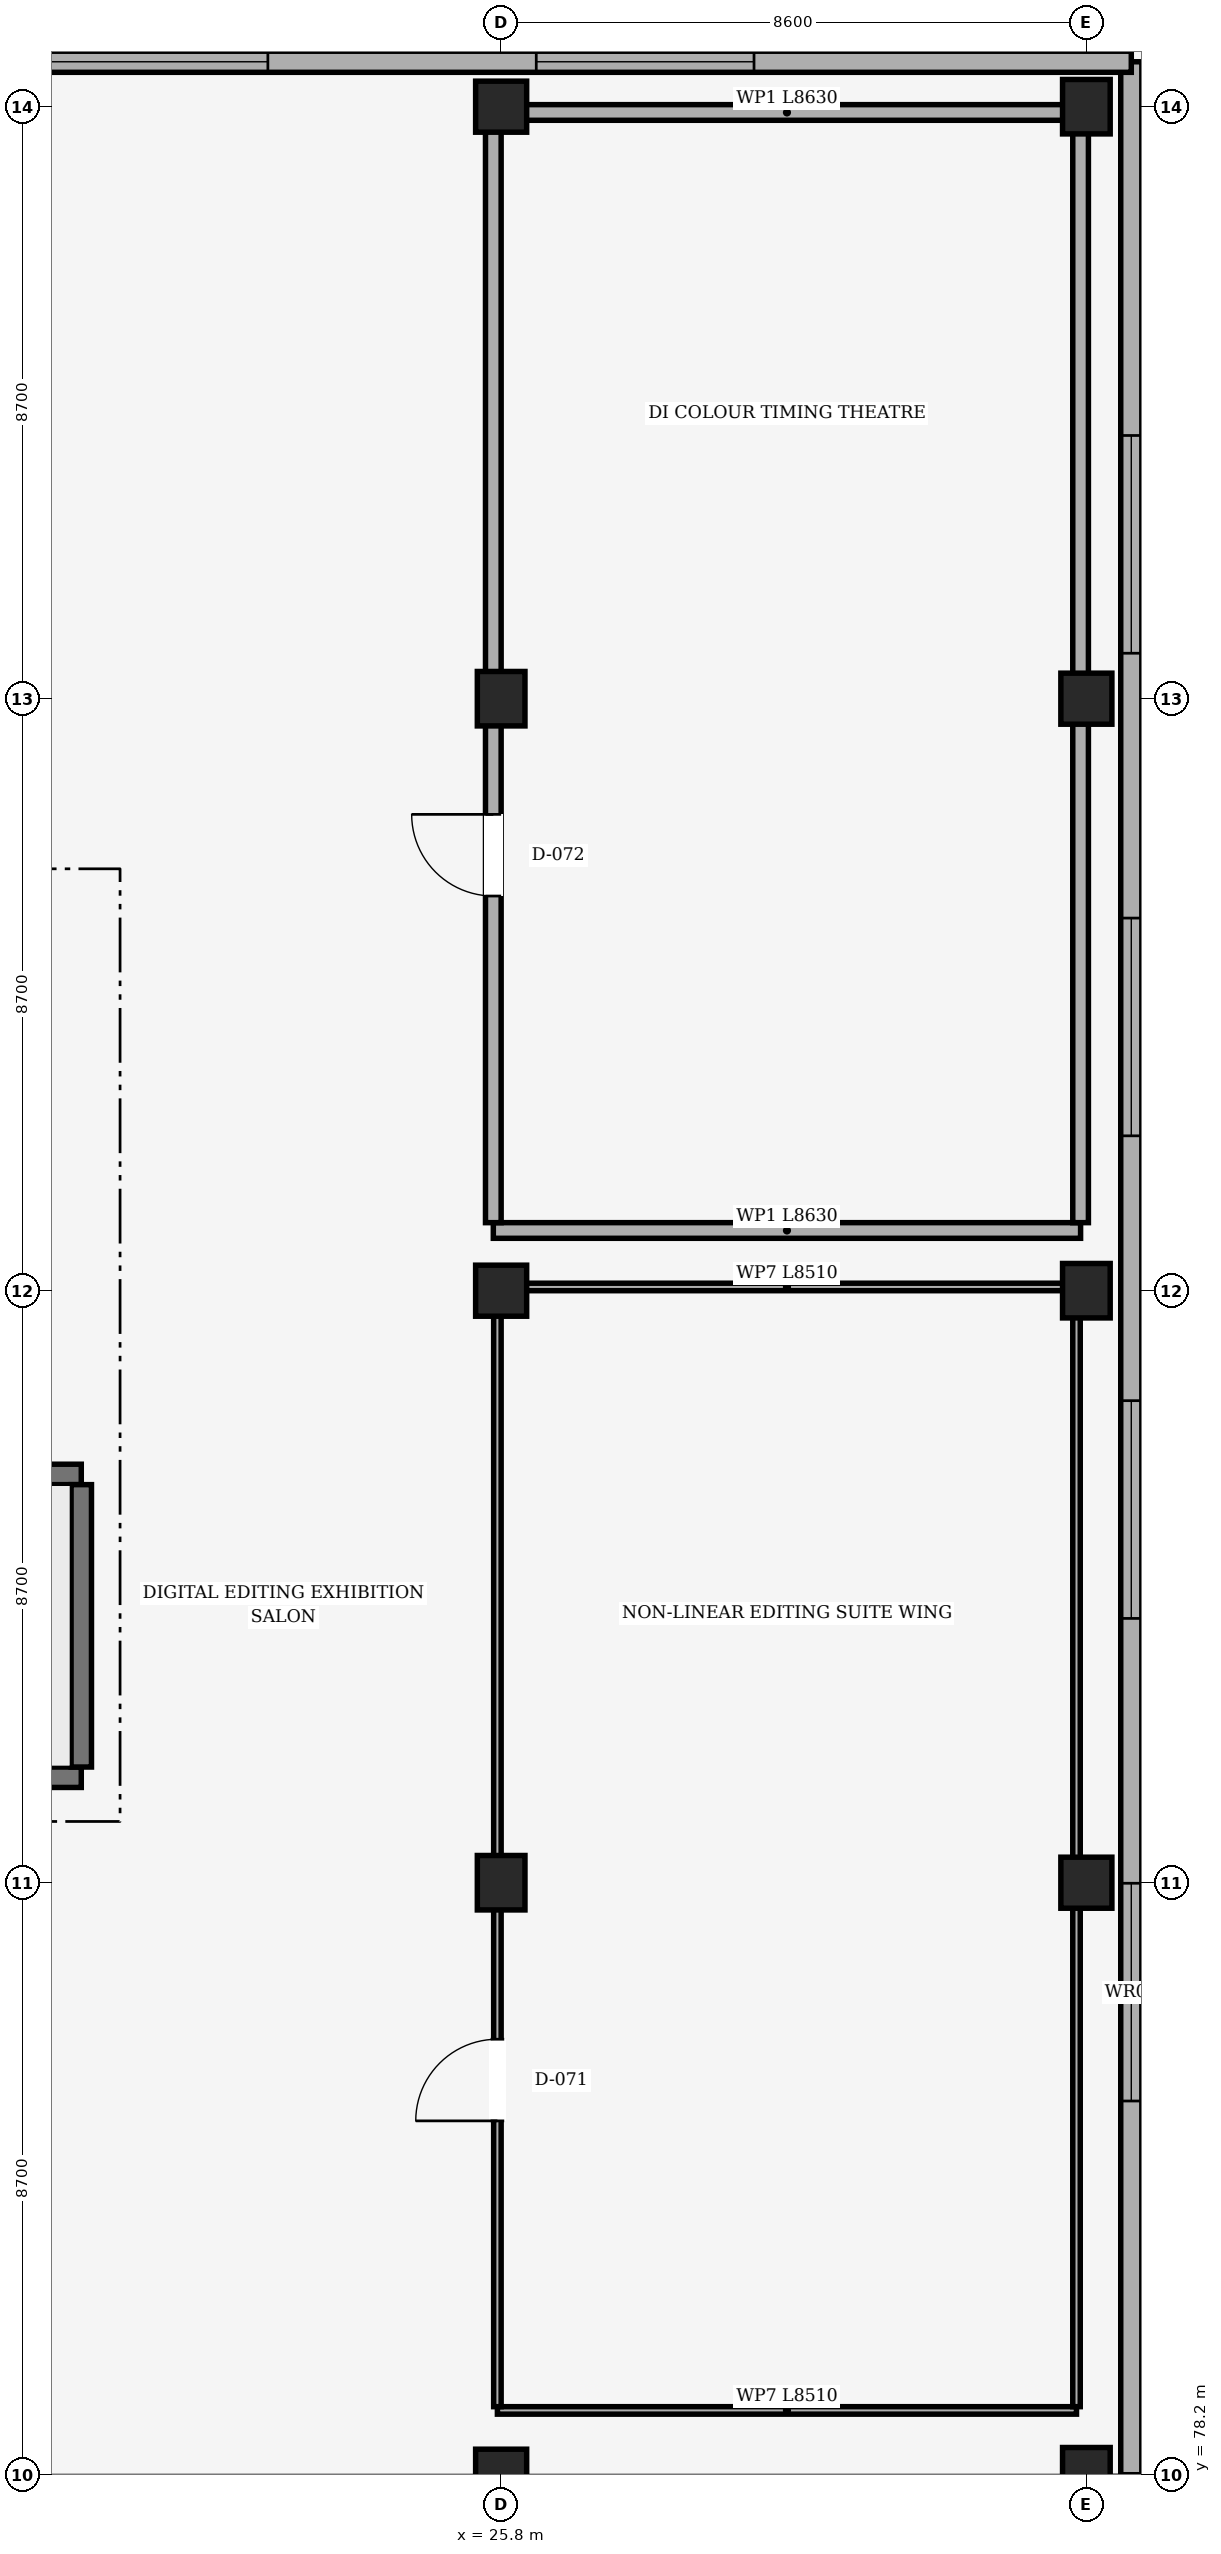
"""IFC4 building model, lengths in metres.
Left out: names, types, materials, properties, quantities, classifications, styles, units other than length and angle.
Written with IfcOpenShell. Run it as: python <this file> out.ifc"""

import sys

from ifc_helpers import new_model, si_unit, direction, frame, frame_2d, origin, origin_2d, place, context, subcontext, project, spatial, rectangle, extrude, element, fill, save


model = new_model("IFC4")
c1 = context("Model", 3, precision=1e-05, world=origin(), true_north=direction((0.0, 1.0)))
c2 = subcontext(c1, "Body", "Model", "MODEL_VIEW")
j1 = project(units=[si_unit("LENGTHUNIT", "METRE"), si_unit("PLANEANGLEUNIT", "RADIAN")], contexts=[c1])
p1 = place(None, origin())
s1 = spatial("IfcSite", under=j1, at=p1, CompositionType="ELEMENT")
p2 = place(p1, origin())
s2 = spatial("IfcBuilding", under=s1, at=p2, CompositionType="ELEMENT")
p3 = place(p2, frame((0.0, 0.0, 4.5)))
s3 = spatial("IfcBuildingStorey", under=s2, at=p3, CompositionType="ELEMENT", Elevation=4.5)
p4 = place(p3, frame((25.8, 78.2, 0.0), z_axis=(0.0, 0.0, 1.0), x_axis=(1.0, 0.0, 0.0)))
e1 = element("IfcColumn", 1, at=p4, inside=s3, PredefinedType="COLUMN", context=c2, shape_type="SweptSolid", body=[
    extrude(rectangle(XDim=0.75, YDim=0.75, at=origin_2d()), origin(), (0.0, 0.0, 1.0), 3.65),
])
p5 = place(p3, frame((25.8, 86.9, 0.0), z_axis=(0.0, 0.0, 1.0), x_axis=(1.0, 0.0, 0.0)))
e2 = element("IfcColumn", 2, at=p5, inside=s3, PredefinedType="COLUMN", context=c2, shape_type="SweptSolid", body=[
    extrude(rectangle(XDim=0.7, YDim=0.8, at=origin_2d()), origin(), (0.0, 0.0, 1.0), 3.65),
])
p6 = place(p3, frame((25.8, 95.6, 0.0), z_axis=(0.0, 0.0, 1.0), x_axis=(1.0, 0.0, 0.0)))
e3 = element("IfcColumn", 3, at=p6, inside=s3, PredefinedType="COLUMN", context=c2, shape_type="SweptSolid", body=[
    extrude(rectangle(XDim=0.75, YDim=0.75, at=origin_2d()), origin(), (0.0, 0.0, 1.0), 3.65),
])
p7 = place(p3, frame((25.8, 104.3, 0.0), z_axis=(0.0, 0.0, 1.0), x_axis=(1.0, 0.0, 0.0)))
e4 = element("IfcColumn", 4, at=p7, inside=s3, PredefinedType="COLUMN", context=c2, shape_type="SweptSolid", body=[
    extrude(rectangle(XDim=0.7, YDim=0.8, at=origin_2d()), origin(), (0.0, 0.0, 1.0), 3.65),
])
p8 = place(p3, frame((25.8, 113.0, 0.0), z_axis=(0.0, 0.0, 1.0), x_axis=(1.0, 0.0, 0.0)))
e5 = element("IfcColumn", 5, at=p8, inside=s3, PredefinedType="COLUMN", context=c2, shape_type="SweptSolid", body=[
    extrude(rectangle(XDim=0.75, YDim=0.75, at=origin_2d()), origin(), (0.0, 0.0, 1.0), 3.65),
])
p9 = place(p3, frame((34.4, 78.2, 0.0), z_axis=(0.0, 0.0, 1.0), x_axis=(1.0, 0.0, 0.0)))
e6 = element("IfcColumn", 6, at=p9, inside=s3, PredefinedType="COLUMN", context=c2, shape_type="SweptSolid", body=[
    extrude(rectangle(XDim=0.7, YDim=0.8, at=origin_2d()), origin(), (0.0, 0.0, 1.0), 3.65),
])
p10 = place(p3, frame((34.4, 86.9, 0.0), z_axis=(0.0, 0.0, 1.0), x_axis=(1.0, 0.0, 0.0)))
e7 = element("IfcColumn", 7, at=p10, inside=s3, PredefinedType="COLUMN", context=c2, shape_type="SweptSolid", body=[
    extrude(rectangle(XDim=0.75, YDim=0.75, at=origin_2d()), origin(), (0.0, 0.0, 1.0), 3.65),
])
p11 = place(p3, frame((34.4, 95.6, 0.0), z_axis=(0.0, 0.0, 1.0), x_axis=(1.0, 0.0, 0.0)))
e8 = element("IfcColumn", 8, at=p11, inside=s3, PredefinedType="COLUMN", context=c2, shape_type="SweptSolid", body=[
    extrude(rectangle(XDim=0.7, YDim=0.8, at=origin_2d()), origin(), (0.0, 0.0, 1.0), 3.65),
])
p12 = place(p3, frame((34.4, 104.3, 0.0), z_axis=(0.0, 0.0, 1.0), x_axis=(1.0, 0.0, 0.0)))
e9 = element("IfcColumn", 9, at=p12, inside=s3, PredefinedType="COLUMN", context=c2, shape_type="SweptSolid", body=[
    extrude(rectangle(XDim=0.75, YDim=0.75, at=origin_2d()), origin(), (0.0, 0.0, 1.0), 3.65),
])
p13 = place(p3, frame((34.4, 113.0, 0.0), z_axis=(0.0, 0.0, 1.0), x_axis=(1.0, 0.0, 0.0)))
e10 = element("IfcColumn", 10, at=p13, inside=s3, PredefinedType="COLUMN", context=c2, shape_type="SweptSolid", body=[
    extrude(rectangle(XDim=0.7, YDim=0.8, at=origin_2d()), origin(), (0.0, 0.0, 1.0), 3.65),
])
p14 = place(p3, frame((35.06, 78.2, 0.0), z_axis=(0.0, 0.0, 1.0), x_axis=(0.0, 1.0, 0.0)))
e11 = element("IfcWall", 11, at=p14, inside=s3, PredefinedType="SOLIDWALL", context=c2, shape_type="SweptSolid", body=[
    extrude(rectangle(XDim=35.46, YDim=0.31, at=frame_2d((17.73, 0.0))), origin(), (0.0, 0.0, 1.0), 3.9),
])
p15 = place(p14, frame((5.492, 0.0, 1.55)))
e12 = element("IfcOpeningElement", 12, at=p15, cuts=e11, PredefinedType="OPENING", context=c2, shape_type="SweptSolid", body=[
    extrude(rectangle(XDim=3.2, YDim=0.7, at=frame_2d((1.6, 0.35))), frame((0.0, 0.155, 0.0), z_axis=(0.0, -1.0, 0.0), x_axis=(1.0, 0.0, 0.0)), (0.0, 0.0, 1.0), 0.31),
])
p16 = place(p14, frame((12.584, 0.0, 1.55)))
e13 = element("IfcOpeningElement", 13, at=p16, cuts=e11, PredefinedType="OPENING", context=c2, shape_type="SweptSolid", body=[
    extrude(rectangle(XDim=3.2, YDim=0.7, at=frame_2d((1.6, 0.35))), frame((0.0, 0.155, 0.0), z_axis=(0.0, -1.0, 0.0), x_axis=(1.0, 0.0, 0.0)), (0.0, 0.0, 1.0), 0.31),
])
p17 = place(p14, frame((19.676, 0.0, 1.55)))
e14 = element("IfcOpeningElement", 14, at=p17, cuts=e11, PredefinedType="OPENING", context=c2, shape_type="SweptSolid", body=[
    extrude(rectangle(XDim=3.2, YDim=0.7, at=frame_2d((1.6, 0.35))), frame((0.0, 0.155, 0.0), z_axis=(0.0, -1.0, 0.0), x_axis=(1.0, 0.0, 0.0)), (0.0, 0.0, 1.0), 0.31),
])
p18 = place(p14, frame((26.768, 0.0, 1.55)))
e15 = element("IfcOpeningElement", 15, at=p18, cuts=e11, PredefinedType="OPENING", context=c2, shape_type="SweptSolid", body=[
    extrude(rectangle(XDim=3.2, YDim=0.7, at=frame_2d((1.6, 0.35))), frame((0.0, 0.155, 0.0), z_axis=(0.0, -1.0, 0.0), x_axis=(1.0, 0.0, 0.0)), (0.0, 0.0, 1.0), 0.31),
])
p19 = place(p3, frame((-0.66, 113.66, 0.0), z_axis=(0.0, 0.0, 1.0), x_axis=(1.0, 0.0, 0.0)))
e16 = element("IfcWall", 16, at=p19, inside=s3, PredefinedType="SOLIDWALL", context=c2, shape_type="SweptSolid", body=[
    extrude(rectangle(XDim=35.72, YDim=0.31, at=frame_2d((17.86, 0.0))), origin(), (0.0, 0.0, 1.0), 3.9),
])
p20 = place(p19, frame((5.544, 0.0, 1.55)))
e17 = element("IfcOpeningElement", 17, at=p20, cuts=e16, PredefinedType="OPENING", context=c2, shape_type="SweptSolid", body=[
    extrude(rectangle(XDim=3.2, YDim=0.7, at=frame_2d((1.6, 0.35))), frame((0.0, 0.155, 0.0), z_axis=(0.0, -1.0, 0.0), x_axis=(1.0, 0.0, 0.0)), (0.0, 0.0, 1.0), 0.31),
])
p21 = place(p19, frame((12.688, 0.0, 1.55)))
e18 = element("IfcOpeningElement", 18, at=p21, cuts=e16, PredefinedType="OPENING", context=c2, shape_type="SweptSolid", body=[
    extrude(rectangle(XDim=3.2, YDim=0.7, at=frame_2d((1.6, 0.35))), frame((0.0, 0.155, 0.0), z_axis=(0.0, -1.0, 0.0), x_axis=(1.0, 0.0, 0.0)), (0.0, 0.0, 1.0), 0.31),
])
p22 = place(p19, frame((19.832, 0.0, 1.55)))
e19 = element("IfcOpeningElement", 19, at=p22, cuts=e16, PredefinedType="OPENING", context=c2, shape_type="SweptSolid", body=[
    extrude(rectangle(XDim=3.2, YDim=0.7, at=frame_2d((1.6, 0.35))), frame((0.0, 0.155, 0.0), z_axis=(0.0, -1.0, 0.0), x_axis=(1.0, 0.0, 0.0)), (0.0, 0.0, 1.0), 0.31),
])
p23 = place(p19, frame((26.976, 0.0, 1.55)))
e20 = element("IfcOpeningElement", 20, at=p23, cuts=e16, PredefinedType="OPENING", context=c2, shape_type="SweptSolid", body=[
    extrude(rectangle(XDim=3.2, YDim=0.7, at=frame_2d((1.6, 0.35))), frame((0.0, 0.155, 0.0), z_axis=(0.0, -1.0, 0.0), x_axis=(1.0, 0.0, 0.0)), (0.0, 0.0, 1.0), 0.31),
])
for number, where, z_axis, x_axis in (
    (21, (19.63, 88.45, 0.0), (0.0, 0.0, 1.0), (-1.0, 0.0, 0.0)),
    (22, (9.45, 92.9, 0.0), (0.0, 0.0, 1.0), (1.0, 0.0, 0.0)),
):
    element("IfcWall", number, at=place(p3, frame(where, z_axis=z_axis, x_axis=x_axis)), inside=s3, PredefinedType="SHEAR", context=c2, shape_type="SweptSolid", body=[
        extrude(rectangle(XDim=10.18, YDim=0.3, at=frame_2d((5.09, 0.0))), origin(), (0.0, 0.0, 1.0), 3.65),
    ])
p24 = place(p3, frame((19.63, 92.75, 0.0), z_axis=(0.0, 0.0, 1.0), x_axis=(0.0, -1.0, 0.0)))
e23 = element("IfcWall", 23, at=p24, inside=s3, PredefinedType="SHEAR", context=c2, shape_type="SweptSolid", body=[
    extrude(rectangle(XDim=4.15, YDim=0.3, at=frame_2d((2.075, 0.0))), origin(), (0.0, 0.0, 1.0), 3.65),
])
p25 = place(p3, frame((34.255, 79.145, 0.0), z_axis=(0.0, 0.0, 1.0), x_axis=(-1.0, 0.0, 0.0)))
e24 = element("IfcWall", 24, at=p25, inside=s3, PredefinedType="PARTITIONING", context=c2, shape_type="SweptSolid", body=[
    extrude(rectangle(XDim=8.51, YDim=0.11, at=frame_2d((4.255, 0.0))), origin(), (0.0, 0.0, 1.0), 3.63),
])
p26 = place(p3, frame((25.745, 79.2, 0.0), z_axis=(0.0, 0.0, 1.0), x_axis=(0.0, 1.0, 0.0)))
e25 = element("IfcWall", 25, at=p26, inside=s3, PredefinedType="PARTITIONING", context=c2, shape_type="SweptSolid", body=[
    extrude(rectangle(XDim=16.4, YDim=0.11, at=frame_2d((8.2, 0.0))), origin(), (0.0, 0.0, 1.0), 2.83),
])
p27 = place(p26, frame((4.2, 0.0, 0.0)))
e26 = element("IfcOpeningElement", 26, at=p27, cuts=e25, PredefinedType="OPENING", context=c2, shape_type="SweptSolid", body=[
    extrude(rectangle(XDim=1.2, YDim=2.15, at=frame_2d((0.6, 1.075))), frame((0.0, 0.055, 0.0), z_axis=(0.0, -1.0, 0.0), x_axis=(1.0, 0.0, 0.0)), (0.0, 0.0, 1.0), 0.11),
])
p28 = place(p3, frame((25.745, 95.655, 0.0), z_axis=(0.0, 0.0, 1.0), x_axis=(1.0, 0.0, 0.0)))
e27 = element("IfcWall", 27, at=p28, inside=s3, PredefinedType="PARTITIONING", context=c2, shape_type="SweptSolid", body=[
    extrude(rectangle(XDim=8.51, YDim=0.11, at=frame_2d((4.255, 0.0))), origin(), (0.0, 0.0, 1.0), 2.93),
])
p29 = place(p3, frame((34.255, 95.6, 0.0), z_axis=(0.0, 0.0, 1.0), x_axis=(0.0, -1.0, 0.0)))
e28 = element("IfcWall", 28, at=p29, inside=s3, PredefinedType="PARTITIONING", context=c2, shape_type="SweptSolid", body=[
    extrude(rectangle(XDim=16.4, YDim=0.11, at=frame_2d((8.2, 0.0))), origin(), (0.0, 0.0, 1.0), 2.88),
])
p30 = place(p3, frame((34.315, 96.485, 0.0), z_axis=(0.0, 0.0, 1.0), x_axis=(-1.0, 0.0, 0.0)))
e29 = element("IfcWall", 29, at=p30, inside=s3, PredefinedType="PARTITIONING", context=c2, shape_type="SweptSolid", body=[
    extrude(rectangle(XDim=8.63, YDim=0.23, at=frame_2d((4.315, 0.0))), origin(), (0.0, 0.0, 1.0), 3.63),
])
p31 = place(p3, frame((25.685, 96.6, 0.0), z_axis=(0.0, 0.0, 1.0), x_axis=(0.0, 1.0, 0.0)))
e30 = element("IfcWall", 30, at=p31, inside=s3, PredefinedType="PARTITIONING", context=c2, shape_type="SweptSolid", body=[
    extrude(rectangle(XDim=16.2, YDim=0.23, at=frame_2d((8.1, 0.0))), origin(), (0.0, 0.0, 1.0), 2.83),
])
p32 = place(p31, frame((4.8, 0.0, 0.0)))
e31 = element("IfcOpeningElement", 31, at=p32, cuts=e30, PredefinedType="OPENING", context=c2, shape_type="SweptSolid", body=[
    extrude(rectangle(XDim=1.2, YDim=2.15, at=frame_2d((0.6, 1.075))), frame((0.0, 0.115, 0.0), z_axis=(0.0, -1.0, 0.0), x_axis=(1.0, 0.0, 0.0)), (0.0, 0.0, 1.0), 0.23),
])
p33 = place(p3, frame((25.685, 112.915, 0.0), z_axis=(0.0, 0.0, 1.0), x_axis=(1.0, 0.0, 0.0)))
e32 = element("IfcWall", 32, at=p33, inside=s3, PredefinedType="PARTITIONING", context=c2, shape_type="SweptSolid", body=[
    extrude(rectangle(XDim=8.63, YDim=0.23, at=frame_2d((4.315, 0.0))), origin(), (0.0, 0.0, 1.0), 2.98),
])
p34 = place(p3, frame((34.315, 112.8, 0.0), z_axis=(0.0, 0.0, 1.0), x_axis=(0.0, -1.0, 0.0)))
e33 = element("IfcWall", 33, at=p34, inside=s3, PredefinedType="PARTITIONING", context=c2, shape_type="SweptSolid", body=[
    extrude(rectangle(XDim=16.2, YDim=0.23, at=frame_2d((8.1, 0.0))), origin(), (0.0, 0.0, 1.0), 2.83),
])
p35 = place(p15, origin())
e34 = element("IfcWindow", 34, at=p35, inside=s3, PartitioningType="SINGLE_PANEL", PredefinedType="WINDOW", context=c2, shape_type="SweptSolid", body=[
    extrude(rectangle(XDim=3.2, YDim=0.7, at=frame_2d((1.6, 0.35))), frame((0.0, -0.06, 0.0), z_axis=(0.0, -1.0, 0.0), x_axis=(1.0, 0.0, 0.0)), (0.0, 0.0, 1.0), 0.06),
])
fill(e12, e34)
p36 = place(p16, origin())
e35 = element("IfcWindow", 35, at=p36, inside=s3, PartitioningType="SINGLE_PANEL", PredefinedType="WINDOW", context=c2, shape_type="SweptSolid", body=[
    extrude(rectangle(XDim=3.2, YDim=0.7, at=frame_2d((1.6, 0.35))), frame((0.0, -0.06, 0.0), z_axis=(0.0, -1.0, 0.0), x_axis=(1.0, 0.0, 0.0)), (0.0, 0.0, 1.0), 0.06),
])
fill(e13, e35)
p37 = place(p17, origin())
e36 = element("IfcWindow", 36, at=p37, inside=s3, PartitioningType="SINGLE_PANEL", PredefinedType="WINDOW", context=c2, shape_type="SweptSolid", body=[
    extrude(rectangle(XDim=3.2, YDim=0.7, at=frame_2d((1.6, 0.35))), frame((0.0, -0.06, 0.0), z_axis=(0.0, -1.0, 0.0), x_axis=(1.0, 0.0, 0.0)), (0.0, 0.0, 1.0), 0.06),
])
fill(e14, e36)
p38 = place(p18, origin())
e37 = element("IfcWindow", 37, at=p38, inside=s3, PartitioningType="SINGLE_PANEL", PredefinedType="WINDOW", context=c2, shape_type="SweptSolid", body=[
    extrude(rectangle(XDim=3.2, YDim=0.7, at=frame_2d((1.6, 0.35))), frame((0.0, -0.06, 0.0), z_axis=(0.0, -1.0, 0.0), x_axis=(1.0, 0.0, 0.0)), (0.0, 0.0, 1.0), 0.06),
])
fill(e15, e37)
p39 = place(p22, origin())
e38 = element("IfcWindow", 38, at=p39, inside=s3, PartitioningType="SINGLE_PANEL", PredefinedType="WINDOW", context=c2, shape_type="SweptSolid", body=[
    extrude(rectangle(XDim=3.2, YDim=0.7, at=frame_2d((1.6, 0.35))), frame((0.0, -0.06, 0.0), z_axis=(0.0, -1.0, 0.0), x_axis=(1.0, 0.0, 0.0)), (0.0, 0.0, 1.0), 0.06),
])
fill(e19, e38)
p40 = place(p23, origin())
e39 = element("IfcWindow", 39, at=p40, inside=s3, PartitioningType="SINGLE_PANEL", PredefinedType="WINDOW", context=c2, shape_type="SweptSolid", body=[
    extrude(rectangle(XDim=3.2, YDim=0.7, at=frame_2d((1.6, 0.35))), frame((0.0, -0.06, 0.0), z_axis=(0.0, -1.0, 0.0), x_axis=(1.0, 0.0, 0.0)), (0.0, 0.0, 1.0), 0.06),
])
fill(e20, e39)
p41 = place(p27, origin())
e40 = element("IfcDoor", 40, at=p41, inside=s3, OperationType="SINGLE_SWING_LEFT", PredefinedType="DOOR", context=c2, shape_type="SweptSolid", body=[
    extrude(rectangle(XDim=1.2, YDim=2.15, at=frame_2d((0.6, 1.075))), frame((0.0, 0.025, 0.0), z_axis=(0.0, -1.0, 0.0), x_axis=(1.0, 0.0, 0.0)), (0.0, 0.0, 1.0), 0.05),
])
fill(e26, e40)
p42 = place(p32, origin())
e41 = element("IfcDoor", 41, at=p42, inside=s3, OperationType="SINGLE_SWING_RIGHT", PredefinedType="DOOR", context=c2, shape_type="SweptSolid", body=[
    extrude(rectangle(XDim=1.2, YDim=2.15, at=frame_2d((0.6, 1.075))), frame((0.0, 0.025, 0.0), z_axis=(0.0, -1.0, 0.0), x_axis=(1.0, 0.0, 0.0)), (0.0, 0.0, 1.0), 0.05),
])
fill(e31, e41)
save(model, sys.argv[1])
